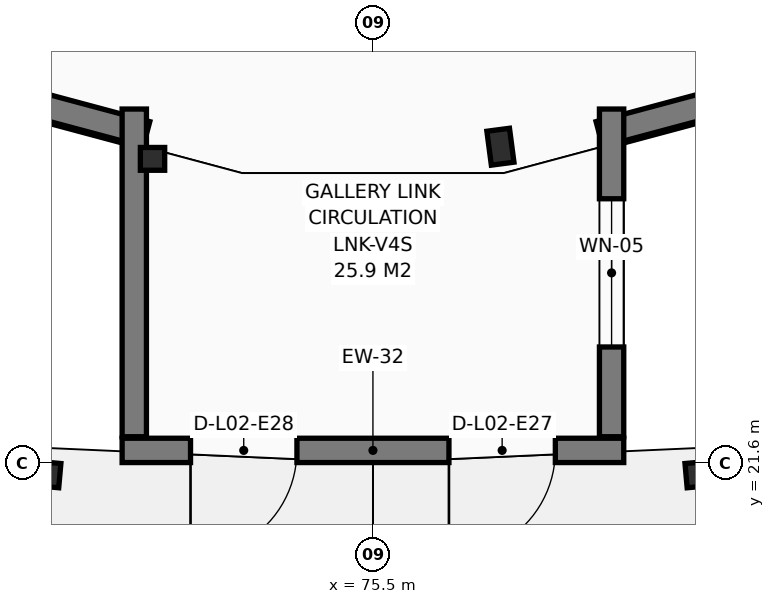
"""IFC4 building model, lengths in metres.
Left out: names, types, materials, properties, quantities, classifications, styles, units other than length and angle.
Written with IfcOpenShell. Run it as: python <this file> out.ifc"""

import sys

from ifc_helpers import new_model, si_unit, direction, frame, frame_2d, origin, origin_2d, place, context, subcontext, project, spatial, rectangle, i_section, extrude, element, fill, save


model = new_model("IFC4")
c1 = context("Model", 3, precision=1e-05, world=origin(), true_north=direction((0.0, 1.0)))
c2 = subcontext(c1, "Body", "Model", "MODEL_VIEW")
j1 = project(units=[si_unit("LENGTHUNIT", "METRE"), si_unit("PLANEANGLEUNIT", "RADIAN")], contexts=[c1])
p1 = place(None, origin())
s1 = spatial("IfcSite", under=j1, at=p1, CompositionType="ELEMENT")
p2 = place(p1, origin())
s2 = spatial("IfcBuilding", under=s1, at=p2, CompositionType="ELEMENT")
p3 = place(p2, frame((0.0, 0.0, 9.52)))
s3 = spatial("IfcBuildingStorey", under=s2, at=p3, CompositionType="ELEMENT", Elevation=9.52)
for number, where, z_axis, x_axis in (
    (1, (71.231, 21.446, 0.0), (0.0, 0.0, 1.0), (0.089, 0.996, 0.0)),
    (2, (79.769, 21.446, 0.0), (0.0, 0.0, 1.0), (-0.089, 0.996, 0.0)),
):
    element("IfcColumn", number, at=place(p3, frame(where, z_axis=z_axis, x_axis=x_axis)), inside=s3, PredefinedType="COLUMN", context=c2, shape_type="SweptSolid", body=[
        extrude(i_section(OverallWidth=0.3, OverallDepth=0.32, WebThickness=0.011, FlangeThickness=0.021, FilletRadius=0.027, at=origin_2d()), origin(), (0.0, 0.0, 1.0), 4.16),
    ])
p4 = place(p3, frame((77.177, 25.76, 0.0), z_axis=(0.0, 0.0, 1.0), x_axis=(0.13052619222, -0.991444861374, 0.0)))
e3 = element("IfcColumn", 3, at=p4, inside=s3, PredefinedType="COLUMN", context=c2, shape_type="SweptSolid", body=[
    extrude(i_section(OverallWidth=0.3, OverallDepth=0.45, WebThickness=0.014, FlangeThickness=0.026, FilletRadius=0.027, at=origin_2d()), origin(), (0.0, 0.0, 1.0), 4.16),
])
p5 = place(p3, frame((72.6, 25.6, 0.0), z_axis=(0.0, 0.0, 1.0), x_axis=(1.0, 0.0, 0.0)))
e4 = element("IfcColumn", 4, at=p5, inside=s3, PredefinedType="COLUMN", context=c2, shape_type="SweptSolid", body=[
    extrude(i_section(OverallWidth=0.3, OverallDepth=0.32, WebThickness=0.011, FlangeThickness=0.021, FilletRadius=0.027, at=origin_2d()), origin(), (0.0, 0.0, 1.0), 4.16),
])
p6 = place(p3, frame((80.65, 26.507, 0.0), z_axis=(0.0, 0.0, 1.0), x_axis=(-0.965940290582, -0.258765057592, 0.0)))
e5 = element("IfcWall", 5, at=p6, inside=s3, PredefinedType="SOLIDWALL", context=c2, shape_type="SweptSolid", body=[
    extrude(rectangle(XDim=2.246, YDim=0.34, at=frame_2d((1.123, 0.0))), origin(), (0.0, 0.0, 1.0), 3.96),
])
p7 = place(p3, frame((72.52, 25.926, 0.0), z_axis=(0.0, 0.0, 1.0), x_axis=(-0.965939655771, 0.258767427258, 0.0)))
e6 = element("IfcWall", 6, at=p7, inside=s3, PredefinedType="SOLIDWALL", context=c2, shape_type="SweptSolid", body=[
    extrude(rectangle(XDim=2.077, YDim=0.34, at=frame_2d((1.038, 0.0))), origin(), (0.0, 0.0, 1.0), 3.96),
])
p8 = place(p3, frame((72.36, 21.945, 0.0), z_axis=(0.0, 0.0, 1.0), x_axis=(0.0, 1.0, 0.0)))
e7 = element("IfcWall", 7, at=p8, inside=s3, PredefinedType="SOLIDWALL", context=c2, shape_type="SweptSolid", body=[
    extrude(rectangle(XDim=4.311, YDim=0.32, at=frame_2d((2.156, 0.0))), origin(), (0.0, 0.0, 1.0), 3.91),
])
p9 = place(p3, frame((78.64, 26.256, 0.0), z_axis=(0.0, 0.0, 1.0), x_axis=(0.0, -1.0, 0.0)))
e8 = element("IfcWall", 8, at=p9, inside=s3, PredefinedType="SOLIDWALL", context=c2, shape_type="SweptSolid", body=[
    extrude(rectangle(XDim=4.311, YDim=0.32, at=frame_2d((2.156, 0.0))), origin(), (0.0, 0.0, 1.0), 3.91),
])
p10 = place(p9, frame((1.18, 0.0, 1.12)))
e9 = element("IfcOpeningElement", 9, at=p10, cuts=e8, PredefinedType="OPENING", context=c2, shape_type="SweptSolid", body=[
    extrude(rectangle(XDim=1.95, YDim=1.5, at=frame_2d((0.975, 0.75))), frame((0.0, 0.17, 0.0), z_axis=(0.0, -1.0, 0.0), x_axis=(1.0, 0.0, 0.0)), (0.0, 0.0, 1.0), 0.34),
])
p11 = place(p3, frame((78.8, 21.765, 0.0), z_axis=(0.0, 0.0, 1.0), x_axis=(-1.0, 0.0, 0.0)))
e10 = element("IfcWall", 10, at=p11, inside=s3, PredefinedType="SOLIDWALL", context=c2, shape_type="SweptSolid", body=[
    extrude(rectangle(XDim=6.6, YDim=0.32, at=frame_2d((3.3, 0.0))), origin(), (0.0, 0.0, 1.0), 3.91),
])
p12 = place(p11, frame((0.9, 0.0, 0.0)))
e11 = element("IfcOpeningElement", 11, at=p12, cuts=e10, PredefinedType="OPENING", context=c2, shape_type="SweptSolid", body=[
    extrude(rectangle(XDim=1.4, YDim=2.2, at=frame_2d((0.7, 1.1))), frame((0.0, 0.17, 0.0), z_axis=(0.0, -1.0, 0.0), x_axis=(1.0, 0.0, 0.0)), (0.0, 0.0, 1.0), 0.34),
])
p13 = place(p11, frame((4.3, 0.0, 0.0)))
e12 = element("IfcOpeningElement", 12, at=p13, cuts=e10, PredefinedType="OPENING", context=c2, shape_type="SweptSolid", body=[
    extrude(rectangle(XDim=1.4, YDim=2.2, at=frame_2d((0.7, 1.1))), frame((0.0, 0.17, 0.0), z_axis=(0.0, -1.0, 0.0), x_axis=(1.0, 0.0, 0.0)), (0.0, 0.0, 1.0), 0.34),
])
p14 = place(p10, origin())
e13 = element("IfcWindow", 13, at=p14, inside=s3, PartitioningType="SINGLE_PANEL", PredefinedType="WINDOW", context=c2, shape_type="SweptSolid", body=[
    extrude(rectangle(XDim=1.95, YDim=1.5, at=frame_2d((0.975, 0.75))), frame((0.0, 0.03, 0.0), z_axis=(0.0, -1.0, 0.0), x_axis=(1.0, 0.0, 0.0)), (0.0, 0.0, 1.0), 0.06),
])
fill(e9, e13)
p15 = place(p12, origin())
e14 = element("IfcDoor", 14, at=p15, inside=s3, OperationType="SINGLE_SWING_RIGHT", PredefinedType="DOOR", context=c2, shape_type="SweptSolid", body=[
    extrude(rectangle(XDim=1.4, YDim=2.2, at=frame_2d((0.7, 1.1))), frame((0.0, 0.025, 0.0), z_axis=(0.0, -1.0, 0.0), x_axis=(1.0, 0.0, 0.0)), (0.0, 0.0, 1.0), 0.05),
])
fill(e11, e14)
p16 = place(p13, origin())
e15 = element("IfcDoor", 15, at=p16, inside=s3, OperationType="SINGLE_SWING_RIGHT", PredefinedType="DOOR", context=c2, shape_type="SweptSolid", body=[
    extrude(rectangle(XDim=1.4, YDim=2.2, at=frame_2d((0.7, 1.1))), frame((0.0, 0.025, 0.0), z_axis=(0.0, -1.0, 0.0), x_axis=(1.0, 0.0, 0.0)), (0.0, 0.0, 1.0), 0.05),
])
fill(e12, e15)
save(model, sys.argv[1])
